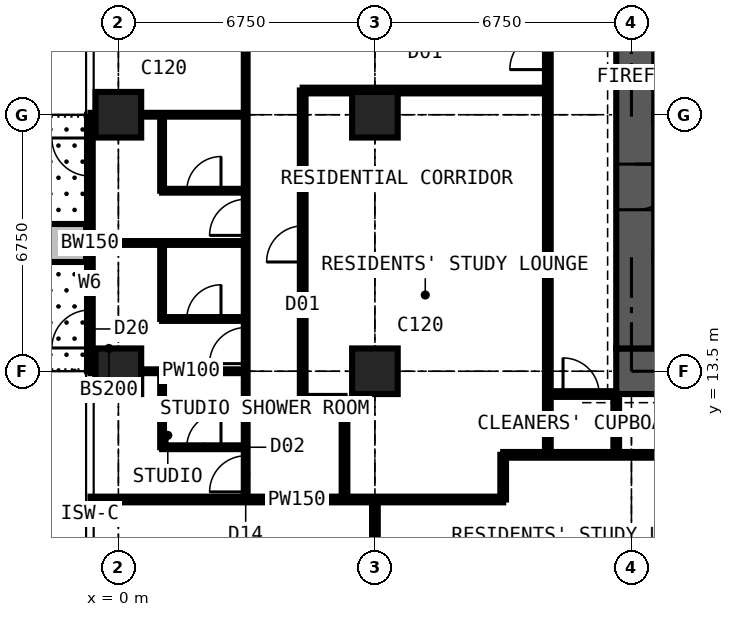
"""IFC4 building model, lengths in metres.
Left out: names, types, materials, properties, quantities, classifications, styles, units other than length and angle.
Written with IfcOpenShell. Run it as: python <this file> out.ifc"""

import sys

from ifc_helpers import new_model, si_unit, direction, frame, frame_2d, origin, origin_2d, place, context, subcontext, project, spatial, rectangle, extrude, element, fill, save


model = new_model("IFC4")
c1 = context("Model", 3, precision=1e-05, world=origin(), true_north=direction((0.0, 1.0)))
c2 = subcontext(c1, "Body", "Model", "MODEL_VIEW")
j1 = project(units=[si_unit("LENGTHUNIT", "METRE"), si_unit("PLANEANGLEUNIT", "RADIAN")], contexts=[c1])
p1 = place(None, origin())
s1 = spatial("IfcSite", under=j1, at=p1, CompositionType="ELEMENT")
p2 = place(p1, origin())
s2 = spatial("IfcBuilding", under=s1, at=p2, CompositionType="ELEMENT")
p3 = place(p2, frame((0.0, 0.0, 192.6)))
s3 = spatial("IfcBuildingStorey", under=s2, at=p3, CompositionType="ELEMENT", Elevation=192.6)
for number, where, z_axis, x_axis in (
    (1, (0.0, 13.5, 0.0), (0.0, 0.0, 1.0), (1.0, 0.0, 0.0)),
    (2, (0.0, 20.25, 0.0), (0.0, 0.0, 1.0), (1.0, 0.0, 0.0)),
    (3, (6.75, 13.5, 0.0), (0.0, 0.0, 1.0), (1.0, 0.0, 0.0)),
    (4, (6.75, 20.25, 0.0), (0.0, 0.0, 1.0), (1.0, 0.0, 0.0)),
):
    element("IfcColumn", number, at=place(p3, frame(where, z_axis=z_axis, x_axis=x_axis)), inside=s3, PredefinedType="COLUMN", context=c2, shape_type="SweptSolid", body=[
        extrude(rectangle(XDim=1.2, YDim=1.2, at=origin_2d()), origin(), (0.0, 0.0, 1.0), 3.6),
    ])
p4 = place(p3, frame((13.1, 13.5, 0.0), z_axis=(0.0, 0.0, 1.0), x_axis=(1.0, 0.0, 0.0)))
e5 = element("IfcWall", 5, at=p4, inside=s3, PredefinedType="SHEAR", context=c2, shape_type="SweptSolid", body=[
    extrude(rectangle(XDim=14.3, YDim=1.2, at=frame_2d((7.15, 0.0))), origin(), (0.0, 0.0, 1.0), 3.6),
])
p5 = place(p3, frame((13.6, 26.4, 0.0), z_axis=(0.0, 0.0, 1.0), x_axis=(0.0, -1.0, 0.0)))
e6 = element("IfcWall", 6, at=p5, inside=s3, PredefinedType="SHEAR", context=c2, shape_type="SweptSolid", body=[
    extrude(rectangle(XDim=12.3, YDim=1.0, at=frame_2d((6.15, 0.0))), origin(), (0.0, 0.0, 1.0), 3.6),
])
p6 = place(p5, frame((7.45, 0.0, 0.0)))
e7 = element("IfcOpeningElement", 7, at=p6, cuts=e6, PredefinedType="OPENING", context=c2, shape_type="SweptSolid", body=[
    extrude(rectangle(XDim=1.2, YDim=2.2, at=frame_2d((0.6, 1.1))), frame((0.0, 0.51, 0.0), z_axis=(0.0, -1.0, 0.0), x_axis=(1.0, 0.0, 0.0)), (0.0, 0.0, 1.0), 1.02),
])
p7 = place(p3, frame((-0.75, 13.5, 0.0), z_axis=(0.0, 0.0, 1.0), x_axis=(0.0, 1.0, 0.0)))
e8 = element("IfcWall", 8, at=p7, inside=s3, PredefinedType="SOLIDWALL", context=c2, shape_type="SweptSolid", body=[
    extrude(rectangle(XDim=6.75, YDim=0.15, at=frame_2d((3.375, 0.0))), origin(), (0.0, 0.0, 1.0), 3.375),
])
p8 = place(p7, frame((0.613, 0.0, 0.0)))
e9 = element("IfcOpeningElement", 9, at=p8, cuts=e8, PredefinedType="OPENING", context=c2, shape_type="SweptSolid", body=[
    extrude(rectangle(XDim=1.0, YDim=2.2, at=frame_2d((0.5, 1.1))), frame((0.0, 0.085, 0.0), z_axis=(0.0, -1.0, 0.0), x_axis=(1.0, 0.0, 0.0)), (0.0, 0.0, 1.0), 0.17),
])
p9 = place(p7, frame((1.725, 0.0, 0.9)))
e10 = element("IfcOpeningElement", 10, at=p9, cuts=e8, PredefinedType="OPENING", context=c2, shape_type="SweptSolid", body=[
    extrude(rectangle(XDim=1.2, YDim=1.8, at=frame_2d((0.6, 0.9))), frame((0.0, 0.085, 0.0), z_axis=(0.0, -1.0, 0.0), x_axis=(1.0, 0.0, 0.0)), (0.0, 0.0, 1.0), 0.17),
])
p10 = place(p7, frame((5.137, 0.0, 0.0)))
e11 = element("IfcOpeningElement", 11, at=p10, cuts=e8, PredefinedType="OPENING", context=c2, shape_type="SweptSolid", body=[
    extrude(rectangle(XDim=1.0, YDim=2.2, at=frame_2d((0.5, 1.1))), frame((0.0, 0.085, 0.0), z_axis=(0.0, -1.0, 0.0), x_axis=(1.0, 0.0, 0.0)), (0.0, 0.0, 1.0), 0.17),
])
p11 = place(p7, frame((3.825, 0.0, 0.9)))
e12 = element("IfcOpeningElement", 12, at=p11, cuts=e8, PredefinedType="OPENING", context=c2, shape_type="SweptSolid", body=[
    extrude(rectangle(XDim=1.2, YDim=1.8, at=frame_2d((0.6, 0.9))), frame((0.0, 0.085, 0.0), z_axis=(0.0, -1.0, 0.0), x_axis=(1.0, 0.0, 0.0)), (0.0, 0.0, 1.0), 0.17),
])
p12 = place(p3, frame((-0.85, 16.875, 0.0), z_axis=(0.0, 0.0, 1.0), x_axis=(-1.0, 0.0, 0.0)))
e13 = element("IfcWall", 13, at=p12, inside=s3, PredefinedType="USERDEFINED", context=c2, shape_type="SweptSolid", body=[
    extrude(rectangle(XDim=2.2, YDim=1.0, at=frame_2d((1.1, 0.0))), origin(), (0.0, 0.0, 1.0), 0.9),
])
p13 = place(p3, frame((-0.734, 10.125, 0.0), z_axis=(0.0, 0.0, 1.0), x_axis=(1.0, 0.0, 0.0)))
e14 = element("IfcWall", 14, at=p13, inside=s3, PredefinedType="PARTITIONING", context=c2, shape_type="SweptSolid", body=[
    extrude(rectangle(XDim=10.859, YDim=0.15, at=frame_2d((5.429, 0.0))), origin(), (0.0, 0.0, 1.0), 3.375),
])
p14 = place(p3, frame((-0.734, 13.5, 0.0), z_axis=(0.0, 0.0, 1.0), x_axis=(1.0, 0.0, 0.0)))
e15 = element("IfcWall", 15, at=p14, inside=s3, PredefinedType="PARTITIONING", context=c2, shape_type="SweptSolid", body=[
    extrude(rectangle(XDim=4.084, YDim=0.1, at=frame_2d((2.042, 0.0))), origin(), (0.0, 0.0, 1.0), 2.877),
])
p15 = place(p3, frame((-0.734, 16.875, 0.0), z_axis=(0.0, 0.0, 1.0), x_axis=(1.0, 0.0, 0.0)))
e16 = element("IfcWall", 16, at=p15, inside=s3, PredefinedType="PARTITIONING", context=c2, shape_type="SweptSolid", body=[
    extrude(rectangle(XDim=4.084, YDim=0.1, at=frame_2d((2.042, 0.0))), origin(), (0.0, 0.0, 1.0), 3.375),
])
p16 = place(p3, frame((-0.734, 20.25, 0.0), z_axis=(0.0, 0.0, 1.0), x_axis=(1.0, 0.0, 0.0)))
e17 = element("IfcWall", 17, at=p16, inside=s3, PredefinedType="PARTITIONING", context=c2, shape_type="SweptSolid", body=[
    extrude(rectangle(XDim=4.084, YDim=0.1, at=frame_2d((2.042, 0.0))), origin(), (0.0, 0.0, 1.0), 2.877),
])
p17 = place(p3, frame((1.15, 11.5, 0.0), z_axis=(0.0, 0.0, 1.0), x_axis=(0.0, 1.0, 0.0)))
e18 = element("IfcWall", 18, at=p17, inside=s3, PredefinedType="PARTITIONING", context=c2, shape_type="SweptSolid", body=[
    extrude(rectangle(XDim=2.0, YDim=0.1, at=frame_2d((1.0, 0.0))), origin(), (0.0, 0.0, 1.0), 3.375),
])
p18 = place(p3, frame((1.15, 11.5, 0.0), z_axis=(0.0, 0.0, 1.0), x_axis=(1.0, 0.0, 0.0)))
e19 = element("IfcWall", 19, at=p18, inside=s3, PredefinedType="PARTITIONING", context=c2, shape_type="SweptSolid", body=[
    extrude(rectangle(XDim=2.2, YDim=0.1, at=frame_2d((1.1, 0.0))), origin(), (0.0, 0.0, 1.0), 3.375),
])
p19 = place(p18, frame((0.65, 0.0, 0.0)))
e20 = element("IfcOpeningElement", 20, at=p19, cuts=e19, PredefinedType="OPENING", context=c2, shape_type="SweptSolid", body=[
    extrude(rectangle(XDim=0.9, YDim=2.2, at=frame_2d((0.45, 1.1))), frame((0.0, 0.06, 0.0), z_axis=(0.0, -1.0, 0.0), x_axis=(1.0, 0.0, 0.0)), (0.0, 0.0, 1.0), 0.12),
])
p20 = place(p3, frame((1.15, 14.875, 0.0), z_axis=(0.0, 0.0, 1.0), x_axis=(0.0, 1.0, 0.0)))
e21 = element("IfcWall", 21, at=p20, inside=s3, PredefinedType="PARTITIONING", context=c2, shape_type="SweptSolid", body=[
    extrude(rectangle(XDim=2.0, YDim=0.1, at=frame_2d((1.0, 0.0))), origin(), (0.0, 0.0, 1.0), 3.375),
])
p21 = place(p3, frame((1.15, 14.875, 0.0), z_axis=(0.0, 0.0, 1.0), x_axis=(1.0, 0.0, 0.0)))
e22 = element("IfcWall", 22, at=p21, inside=s3, PredefinedType="PARTITIONING", context=c2, shape_type="SweptSolid", body=[
    extrude(rectangle(XDim=2.2, YDim=0.1, at=frame_2d((1.1, 0.0))), origin(), (0.0, 0.0, 1.0), 3.375),
])
p22 = place(p21, frame((0.65, 0.0, 0.0)))
e23 = element("IfcOpeningElement", 23, at=p22, cuts=e22, PredefinedType="OPENING", context=c2, shape_type="SweptSolid", body=[
    extrude(rectangle(XDim=0.9, YDim=2.2, at=frame_2d((0.45, 1.1))), frame((0.0, 0.06, 0.0), z_axis=(0.0, -1.0, 0.0), x_axis=(1.0, 0.0, 0.0)), (0.0, 0.0, 1.0), 0.12),
])
p23 = place(p3, frame((1.15, 18.25, 0.0), z_axis=(0.0, 0.0, 1.0), x_axis=(0.0, 1.0, 0.0)))
e24 = element("IfcWall", 24, at=p23, inside=s3, PredefinedType="PARTITIONING", context=c2, shape_type="SweptSolid", body=[
    extrude(rectangle(XDim=2.0, YDim=0.1, at=frame_2d((1.0, 0.0))), origin(), (0.0, 0.0, 1.0), 3.375),
])
p24 = place(p3, frame((1.15, 18.25, 0.0), z_axis=(0.0, 0.0, 1.0), x_axis=(1.0, 0.0, 0.0)))
e25 = element("IfcWall", 25, at=p24, inside=s3, PredefinedType="PARTITIONING", context=c2, shape_type="SweptSolid", body=[
    extrude(rectangle(XDim=2.2, YDim=0.1, at=frame_2d((1.1, 0.0))), origin(), (0.0, 0.0, 1.0), 3.375),
])
p25 = place(p24, frame((0.65, 0.0, 0.0)))
e26 = element("IfcOpeningElement", 26, at=p25, cuts=e25, PredefinedType="OPENING", context=c2, shape_type="SweptSolid", body=[
    extrude(rectangle(XDim=0.9, YDim=2.2, at=frame_2d((0.45, 1.1))), frame((0.0, 0.06, 0.0), z_axis=(0.0, -1.0, 0.0), x_axis=(1.0, 0.0, 0.0)), (0.0, 0.0, 1.0), 0.12),
])
p26 = place(p3, frame((3.35, 10.125, 0.0), z_axis=(0.0, 0.0, 1.0), x_axis=(0.0, 1.0, 0.0)))
e27 = element("IfcWall", 27, at=p26, inside=s3, PredefinedType="PARTITIONING", context=c2, shape_type="SweptSolid", body=[
    extrude(rectangle(XDim=16.875, YDim=0.1, at=frame_2d((8.438, 0.0))), origin(), (0.0, 0.0, 1.0), 3.375),
])
p27 = place(p26, frame((0.2, 0.0, 0.0)))
e28 = element("IfcOpeningElement", 28, at=p27, cuts=e27, PredefinedType="OPENING", context=c2, shape_type="SweptSolid", body=[
    extrude(rectangle(XDim=0.95, YDim=2.2, at=frame_2d((0.475, 1.1))), frame((0.0, 0.06, 0.0), z_axis=(0.0, -1.0, 0.0), x_axis=(1.0, 0.0, 0.0)), (0.0, 0.0, 1.0), 0.12),
])
p28 = place(p26, frame((3.575, 0.0, 0.0)))
e29 = element("IfcOpeningElement", 29, at=p28, cuts=e27, PredefinedType="OPENING", context=c2, shape_type="SweptSolid", body=[
    extrude(rectangle(XDim=0.95, YDim=2.2, at=frame_2d((0.475, 1.1))), frame((0.0, 0.06, 0.0), z_axis=(0.0, -1.0, 0.0), x_axis=(1.0, 0.0, 0.0)), (0.0, 0.0, 1.0), 0.12),
])
p29 = place(p26, frame((6.95, 0.0, 0.0)))
e30 = element("IfcOpeningElement", 30, at=p29, cuts=e27, PredefinedType="OPENING", context=c2, shape_type="SweptSolid", body=[
    extrude(rectangle(XDim=0.95, YDim=2.2, at=frame_2d((0.475, 1.1))), frame((0.0, 0.06, 0.0), z_axis=(0.0, -1.0, 0.0), x_axis=(1.0, 0.0, 0.0)), (0.0, 0.0, 1.0), 0.12),
])
p30 = place(p3, frame((4.85, 12.775, 0.0), z_axis=(0.0, 0.0, 1.0), x_axis=(0.0, 1.0, 0.0)))
e31 = element("IfcWall", 31, at=p30, inside=s3, PredefinedType="PARTITIONING", context=c2, shape_type="SweptSolid", body=[
    extrude(rectangle(XDim=8.113, YDim=0.15, at=frame_2d((4.056, 0.0))), origin(), (0.0, 0.0, 1.0), 3.375),
])
p31 = place(p30, frame((3.6, 0.0, 0.0)))
e32 = element("IfcOpeningElement", 32, at=p31, cuts=e31, PredefinedType="OPENING", context=c2, shape_type="SweptSolid", body=[
    extrude(rectangle(XDim=0.95, YDim=2.2, at=frame_2d((0.475, 1.1))), frame((0.0, 0.085, 0.0), z_axis=(0.0, -1.0, 0.0), x_axis=(1.0, 0.0, 0.0)), (0.0, 0.0, 1.0), 0.17),
])
p32 = place(p3, frame((4.85, 12.775, 0.0), z_axis=(0.0, 0.0, 1.0), x_axis=(1.0, 0.0, 0.0)))
e33 = element("IfcWall", 33, at=p32, inside=s3, PredefinedType="PARTITIONING", context=c2, shape_type="SweptSolid", body=[
    extrude(rectangle(XDim=1.1, YDim=0.15, at=frame_2d((0.55, 0.0))), origin(), (0.0, 0.0, 1.0), 3.375),
])
p33 = place(p3, frame((4.85, 20.887, 0.0), z_axis=(0.0, 0.0, 1.0), x_axis=(1.0, 0.0, 0.0)))
e34 = element("IfcWall", 34, at=p33, inside=s3, PredefinedType="PARTITIONING", context=c2, shape_type="SweptSolid", body=[
    extrude(rectangle(XDim=6.45, YDim=0.15, at=frame_2d((3.225, 0.0))), origin(), (0.0, 0.0, 1.0), 3.375),
])
p34 = place(p3, frame((5.95, 10.125, 0.0), z_axis=(0.0, 0.0, 1.0), x_axis=(0.0, 1.0, 0.0)))
e35 = element("IfcWall", 35, at=p34, inside=s3, PredefinedType="PARTITIONING", context=c2, shape_type="SweptSolid", body=[
    extrude(rectangle(XDim=2.65, YDim=0.15, at=frame_2d((1.325, 0.0))), origin(), (0.0, 0.0, 1.0), 3.375),
])
p35 = place(p3, frame((6.75, 3.35, 0.0), z_axis=(0.0, 0.0, 1.0), x_axis=(0.0, 1.0, 0.0)))
e36 = element("IfcWall", 36, at=p35, inside=s3, PredefinedType="PARTITIONING", context=c2, shape_type="SweptSolid", body=[
    extrude(rectangle(XDim=6.775, YDim=0.15, at=frame_2d((3.387, 0.0))), origin(), (0.0, 0.0, 1.0), 2.877),
])
p36 = place(p3, frame((10.125, 10.125, 0.0), z_axis=(0.0, 0.0, 1.0), x_axis=(0.0, 1.0, 0.0)))
e37 = element("IfcWall", 37, at=p36, inside=s3, PredefinedType="PARTITIONING", context=c2, shape_type="SweptSolid", body=[
    extrude(rectangle(XDim=1.175, YDim=0.15, at=frame_2d((0.587, 0.0))), origin(), (0.0, 0.0, 1.0), 3.375),
])
p37 = place(p3, frame((10.125, 11.3, 0.0), z_axis=(0.0, 0.0, 1.0), x_axis=(1.0, 0.0, 0.0)))
e38 = element("IfcWall", 38, at=p37, inside=s3, PredefinedType="PARTITIONING", context=c2, shape_type="SweptSolid", body=[
    extrude(rectangle(XDim=20.25, YDim=0.15, at=frame_2d((10.125, 0.0))), origin(), (0.0, 0.0, 1.0), 3.375),
])
p38 = place(p37, frame((8.375, 0.0, 0.0)))
e39 = element("IfcOpeningElement", 39, at=p38, cuts=e38, PredefinedType="OPENING", context=c2, shape_type="SweptSolid", body=[
    extrude(rectangle(XDim=1.0, YDim=2.2, at=frame_2d((0.5, 1.1))), frame((0.0, 0.085, 0.0), z_axis=(0.0, -1.0, 0.0), x_axis=(1.0, 0.0, 0.0)), (0.0, 0.0, 1.0), 0.17),
])
p39 = place(p37, frame((10.975, 0.0, 0.0)))
e40 = element("IfcOpeningElement", 40, at=p39, cuts=e38, PredefinedType="OPENING", context=c2, shape_type="SweptSolid", body=[
    extrude(rectangle(XDim=1.0, YDim=2.2, at=frame_2d((0.5, 1.1))), frame((0.0, 0.085, 0.0), z_axis=(0.0, -1.0, 0.0), x_axis=(1.0, 0.0, 0.0)), (0.0, 0.0, 1.0), 0.17),
])
p40 = place(p37, frame((4.875, 0.0, 0.0)))
e41 = element("IfcOpeningElement", 41, at=p40, cuts=e38, PredefinedType="OPENING", context=c2, shape_type="SweptSolid", body=[
    extrude(rectangle(XDim=0.95, YDim=2.2, at=frame_2d((0.475, 1.1))), frame((0.0, 0.085, 0.0), z_axis=(0.0, -1.0, 0.0), x_axis=(1.0, 0.0, 0.0)), (0.0, 0.0, 1.0), 0.17),
])
p41 = place(p3, frame((11.3, 11.3, 0.0), z_axis=(0.0, 0.0, 1.0), x_axis=(0.0, 1.0, 0.0)))
e42 = element("IfcWall", 42, at=p41, inside=s3, PredefinedType="PARTITIONING", context=c2, shape_type="SweptSolid", body=[
    extrude(rectangle(XDim=19.3, YDim=0.15, at=frame_2d((9.65, 0.0))), origin(), (0.0, 0.0, 1.0), 3.375),
])
p42 = place(p41, frame((18.1, 0.0, 0.0)))
e43 = element("IfcOpeningElement", 43, at=p42, cuts=e42, PredefinedType="OPENING", context=c2, shape_type="SweptSolid", body=[
    extrude(rectangle(XDim=1.0, YDim=2.2, at=frame_2d((0.5, 1.1))), frame((0.0, 0.085, 0.0), z_axis=(0.0, -1.0, 0.0), x_axis=(1.0, 0.0, 0.0)), (0.0, 0.0, 1.0), 0.17),
])
p43 = place(p41, frame((10.137, 0.0, 0.0)))
e44 = element("IfcOpeningElement", 44, at=p43, cuts=e42, PredefinedType="OPENING", context=c2, shape_type="SweptSolid", body=[
    extrude(rectangle(XDim=1.0, YDim=2.2, at=frame_2d((0.5, 1.1))), frame((0.0, 0.085, 0.0), z_axis=(0.0, -1.0, 0.0), x_axis=(1.0, 0.0, 0.0)), (0.0, 0.0, 1.0), 0.17),
])
p44 = place(p3, frame((11.3, 12.9, 0.0), z_axis=(0.0, 0.0, 1.0), x_axis=(1.0, 0.0, 0.0)))
e45 = element("IfcWall", 45, at=p44, inside=s3, PredefinedType="PARTITIONING", context=c2, shape_type="SweptSolid", body=[
    extrude(rectangle(XDim=1.8, YDim=0.15, at=frame_2d((0.9, 0.0))), origin(), (0.0, 0.0, 1.0), 2.806),
])
p45 = place(p44, frame((0.4, 0.0, 0.0)))
e46 = element("IfcOpeningElement", 46, at=p45, cuts=e45, PredefinedType="OPENING", context=c2, shape_type="SweptSolid", body=[
    extrude(rectangle(XDim=0.95, YDim=2.2, at=frame_2d((0.475, 1.1))), frame((0.0, 0.085, 0.0), z_axis=(0.0, -1.0, 0.0), x_axis=(1.0, 0.0, 0.0)), (0.0, 0.0, 1.0), 0.17),
])
p46 = place(p3, frame((13.1, 11.3, 0.0), z_axis=(0.0, 0.0, 1.0), x_axis=(0.0, 1.0, 0.0)))
e47 = element("IfcWall", 47, at=p46, inside=s3, PredefinedType="PARTITIONING", context=c2, shape_type="SweptSolid", body=[
    extrude(rectangle(XDim=1.6, YDim=0.15, at=frame_2d((0.8, 0.0))), origin(), (0.0, 0.0, 1.0), 3.375),
])
p47 = place(p8, origin())
e48 = element("IfcDoor", 48, at=p47, inside=s3, OperationType="SINGLE_SWING_LEFT", PredefinedType="DOOR", context=c2, shape_type="SweptSolid", body=[
    extrude(rectangle(XDim=1.0, YDim=2.2, at=frame_2d((0.5, 1.1))), frame((0.0, 0.025, 0.0), z_axis=(0.0, -1.0, 0.0), x_axis=(1.0, 0.0, 0.0)), (0.0, 0.0, 1.0), 0.05),
])
fill(e9, e48)
p48 = place(p9, origin())
e49 = element("IfcWindow", 49, at=p48, inside=s3, PartitioningType="SINGLE_PANEL", PredefinedType="WINDOW", context=c2, shape_type="SweptSolid", body=[
    extrude(rectangle(XDim=1.2, YDim=1.8, at=frame_2d((0.6, 0.9))), frame((0.0, 0.03, 0.0), z_axis=(0.0, -1.0, 0.0), x_axis=(1.0, 0.0, 0.0)), (0.0, 0.0, 1.0), 0.06),
])
fill(e10, e49)
p49 = place(p10, origin())
e50 = element("IfcDoor", 50, at=p49, inside=s3, OperationType="SINGLE_SWING_RIGHT", PredefinedType="DOOR", context=c2, shape_type="SweptSolid", body=[
    extrude(rectangle(XDim=1.0, YDim=2.2, at=frame_2d((0.5, 1.1))), frame((0.0, 0.025, 0.0), z_axis=(0.0, -1.0, 0.0), x_axis=(1.0, 0.0, 0.0)), (0.0, 0.0, 1.0), 0.05),
])
fill(e11, e50)
p50 = place(p11, origin())
e51 = element("IfcWindow", 51, at=p50, inside=s3, PartitioningType="SINGLE_PANEL", PredefinedType="WINDOW", context=c2, shape_type="SweptSolid", body=[
    extrude(rectangle(XDim=1.2, YDim=1.8, at=frame_2d((0.6, 0.9))), frame((0.0, 0.03, 0.0), z_axis=(0.0, -1.0, 0.0), x_axis=(1.0, 0.0, 0.0)), (0.0, 0.0, 1.0), 0.06),
])
fill(e12, e51)
p51 = place(p6, origin())
e52 = element("IfcDoor", 52, at=p51, inside=s3, OperationType="DOUBLE_DOOR_SINGLE_SWING", PredefinedType="DOOR", context=c2, shape_type="SweptSolid", body=[
    extrude(rectangle(XDim=1.2, YDim=2.2, at=frame_2d((0.6, 1.1))), frame((0.0, 0.025, 0.0), z_axis=(0.0, -1.0, 0.0), x_axis=(1.0, 0.0, 0.0)), (0.0, 0.0, 1.0), 0.05),
])
fill(e7, e52)
p52 = place(p45, origin())
e53 = element("IfcDoor", 53, at=p52, inside=s3, OperationType="SINGLE_SWING_LEFT", PredefinedType="DOOR", context=c2, shape_type="SweptSolid", body=[
    extrude(rectangle(XDim=0.95, YDim=2.2, at=frame_2d((0.475, 1.1))), frame((0.0, 0.025, 0.0), z_axis=(0.0, -1.0, 0.0), x_axis=(1.0, 0.0, 0.0)), (0.0, 0.0, 1.0), 0.05),
])
fill(e46, e53)
p53 = place(p27, origin())
e54 = element("IfcDoor", 54, at=p53, inside=s3, OperationType="SINGLE_SWING_LEFT", PredefinedType="DOOR", context=c2, shape_type="SweptSolid", body=[
    extrude(rectangle(XDim=0.95, YDim=2.2, at=frame_2d((0.475, 1.1))), frame((0.0, 0.025, 0.0), z_axis=(0.0, -1.0, 0.0), x_axis=(1.0, 0.0, 0.0)), (0.0, 0.0, 1.0), 0.05),
])
fill(e28, e54)
p54 = place(p19, origin())
e55 = element("IfcDoor", 55, at=p54, inside=s3, OperationType="SINGLE_SWING_RIGHT", PredefinedType="DOOR", context=c2, shape_type="SweptSolid", body=[
    extrude(rectangle(XDim=0.9, YDim=2.2, at=frame_2d((0.45, 1.1))), frame((0.0, 0.025, 0.0), z_axis=(0.0, -1.0, 0.0), x_axis=(1.0, 0.0, 0.0)), (0.0, 0.0, 1.0), 0.05),
])
fill(e20, e55)
p55 = place(p28, origin())
e56 = element("IfcDoor", 56, at=p55, inside=s3, OperationType="SINGLE_SWING_LEFT", PredefinedType="DOOR", context=c2, shape_type="SweptSolid", body=[
    extrude(rectangle(XDim=0.95, YDim=2.2, at=frame_2d((0.475, 1.1))), frame((0.0, 0.025, 0.0), z_axis=(0.0, -1.0, 0.0), x_axis=(1.0, 0.0, 0.0)), (0.0, 0.0, 1.0), 0.05),
])
fill(e29, e56)
p56 = place(p22, origin())
e57 = element("IfcDoor", 57, at=p56, inside=s3, OperationType="SINGLE_SWING_RIGHT", PredefinedType="DOOR", context=c2, shape_type="SweptSolid", body=[
    extrude(rectangle(XDim=0.9, YDim=2.2, at=frame_2d((0.45, 1.1))), frame((0.0, 0.025, 0.0), z_axis=(0.0, -1.0, 0.0), x_axis=(1.0, 0.0, 0.0)), (0.0, 0.0, 1.0), 0.05),
])
fill(e23, e57)
p57 = place(p29, origin())
e58 = element("IfcDoor", 58, at=p57, inside=s3, OperationType="SINGLE_SWING_LEFT", PredefinedType="DOOR", context=c2, shape_type="SweptSolid", body=[
    extrude(rectangle(XDim=0.95, YDim=2.2, at=frame_2d((0.475, 1.1))), frame((0.0, 0.025, 0.0), z_axis=(0.0, -1.0, 0.0), x_axis=(1.0, 0.0, 0.0)), (0.0, 0.0, 1.0), 0.05),
])
fill(e30, e58)
p58 = place(p25, origin())
e59 = element("IfcDoor", 59, at=p58, inside=s3, OperationType="SINGLE_SWING_RIGHT", PredefinedType="DOOR", context=c2, shape_type="SweptSolid", body=[
    extrude(rectangle(XDim=0.9, YDim=2.2, at=frame_2d((0.45, 1.1))), frame((0.0, 0.025, 0.0), z_axis=(0.0, -1.0, 0.0), x_axis=(1.0, 0.0, 0.0)), (0.0, 0.0, 1.0), 0.05),
])
fill(e26, e59)
p59 = place(p43, origin())
e60 = element("IfcDoor", 60, at=p59, inside=s3, OperationType="SINGLE_SWING_LEFT", PredefinedType="DOOR", context=c2, shape_type="SweptSolid", body=[
    extrude(rectangle(XDim=1.0, YDim=2.2, at=frame_2d((0.5, 1.1))), frame((0.0, 0.025, 0.0), z_axis=(0.0, -1.0, 0.0), x_axis=(1.0, 0.0, 0.0)), (0.0, 0.0, 1.0), 0.05),
])
fill(e44, e60)
p60 = place(p31, origin())
e61 = element("IfcDoor", 61, at=p60, inside=s3, OperationType="SINGLE_SWING_LEFT", PredefinedType="DOOR", context=c2, shape_type="SweptSolid", body=[
    extrude(rectangle(XDim=0.95, YDim=2.2, at=frame_2d((0.475, 1.1))), frame((0.0, 0.025, 0.0), z_axis=(0.0, -1.0, 0.0), x_axis=(1.0, 0.0, 0.0)), (0.0, 0.0, 1.0), 0.05),
])
fill(e32, e61)
save(model, sys.argv[1])
